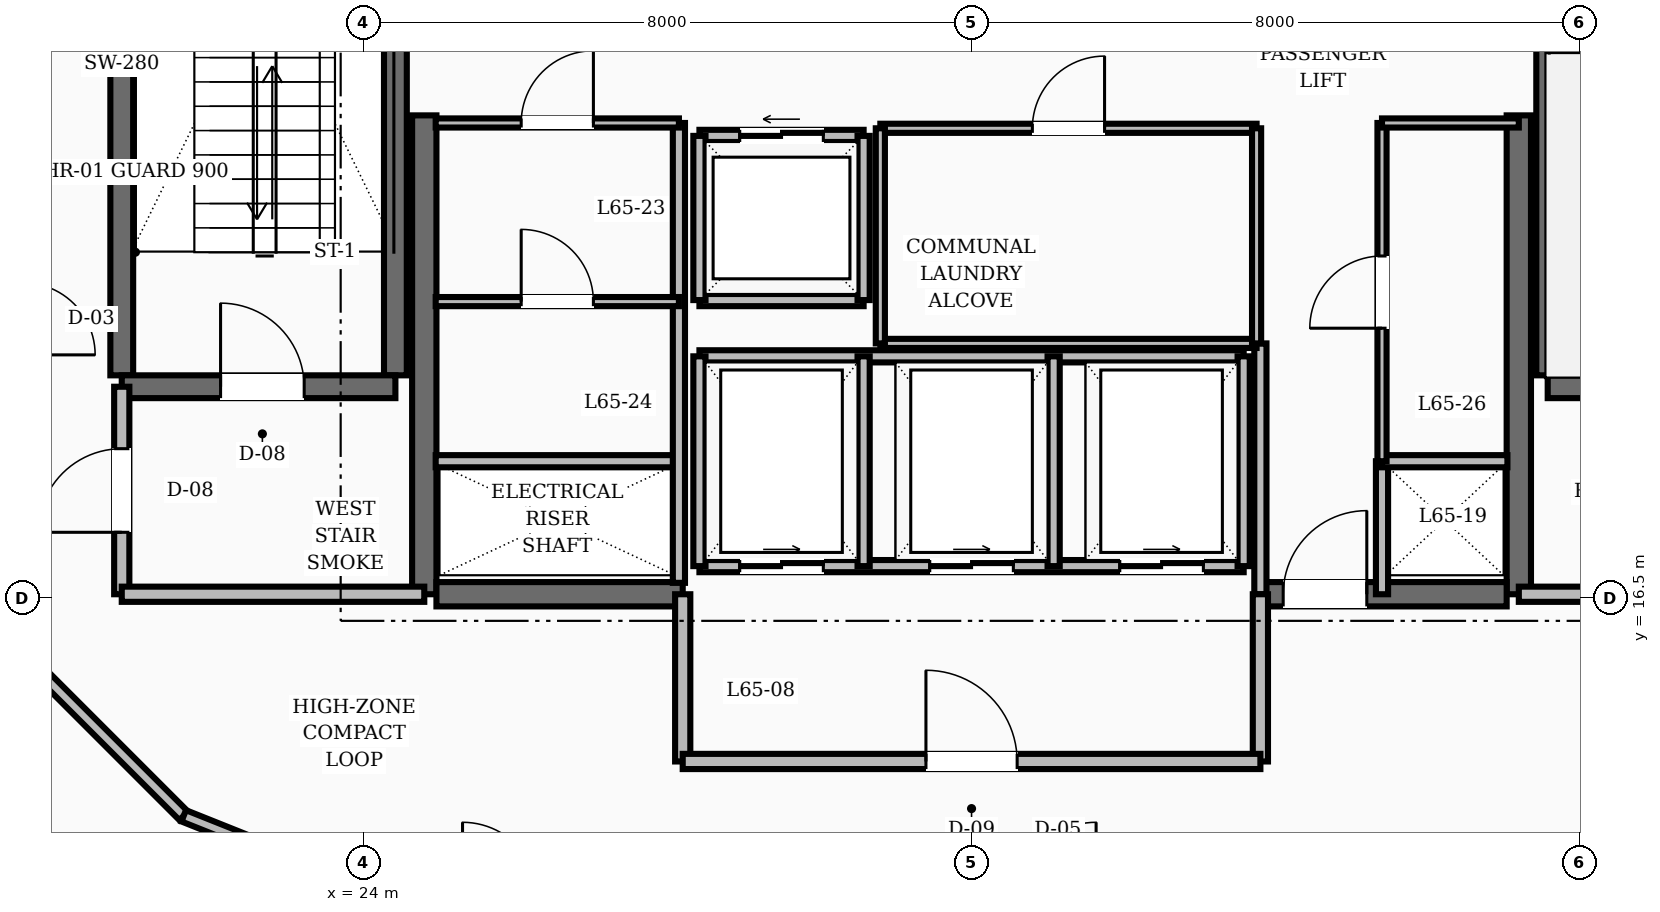
"""IFC4 building model, lengths in metres.
Left out: names, types, materials, properties, quantities, classifications, styles, units other than length and angle.
Written with IfcOpenShell. Run it as: python <this file> out.ifc"""

import sys

from ifc_helpers import new_model, si_unit, direction, frame, frame_2d, origin, place, context, subcontext, project, spatial, rectangle, extrude, element, fill, save


model = new_model("IFC4")
c1 = context("Model", 3, precision=1e-05, world=origin(), true_north=direction((0.0, 1.0)))
c2 = subcontext(c1, "Body", "Model", "MODEL_VIEW")
j1 = project(units=[si_unit("LENGTHUNIT", "METRE"), si_unit("PLANEANGLEUNIT", "RADIAN")], contexts=[c1])
p1 = place(None, origin())
s1 = spatial("IfcSite", under=j1, at=p1, CompositionType="ELEMENT")
p2 = place(p1, origin())
s2 = spatial("IfcBuilding", under=s1, at=p2, CompositionType="ELEMENT")
p3 = place(p2, frame((0.0, 0.0, 250.8)))
s3 = spatial("IfcBuildingStorey", under=s2, at=p3, CompositionType="ELEMENT", Elevation=250.8)
for number, where, z_axis, x_axis in (
    (1, (24.8, 16.55, 0.0), (0.0, 0.0, 1.0), (0.0, 1.0, 0.0)),
    (2, (39.2, 16.55, 0.0), (0.0, 0.0, 1.0), (0.0, 1.0, 0.0)),
):
    element("IfcWall", number, at=place(p3, frame(where, z_axis=z_axis, x_axis=x_axis)), inside=s3, PredefinedType="SHEAR", context=c2, shape_type="SweptSolid", body=[
        extrude(rectangle(XDim=6.3, YDim=0.32, at=frame_2d((3.15, 0.0))), origin(), (0.0, 0.0, 1.0), 3.6),
    ])
p4 = place(p3, frame((24.96, 16.55, 0.0), z_axis=(0.0, 0.0, 1.0), x_axis=(1.0, 0.0, 0.0)))
e3 = element("IfcWall", 3, at=p4, inside=s3, PredefinedType="SHEAR", context=c2, shape_type="SweptSolid", body=[
    extrude(rectangle(XDim=3.24, YDim=0.32, at=frame_2d((1.62, 0.0))), origin(), (0.0, 0.0, 1.0), 3.6),
])
p5 = place(p3, frame((35.8, 16.55, 0.0), z_axis=(0.0, 0.0, 1.0), x_axis=(1.0, 0.0, 0.0)))
e4 = element("IfcWall", 4, at=p5, inside=s3, PredefinedType="SHEAR", context=c2, shape_type="SweptSolid", body=[
    extrude(rectangle(XDim=3.24, YDim=0.32, at=frame_2d((1.62, 0.0))), origin(), (0.0, 0.0, 1.0), 3.6),
])
p6 = place(p5, frame((0.3, 0.0, 0.0)))
e5 = element("IfcOpeningElement", 5, at=p6, cuts=e4, PredefinedType="OPENING", context=c2, shape_type="SweptSolid", body=[
    extrude(rectangle(XDim=1.1, YDim=2.1, at=frame_2d((0.55, 1.05))), frame((0.0, 0.17, 0.0), z_axis=(0.0, -1.0, 0.0), x_axis=(1.0, 0.0, 0.0)), (0.0, 0.0, 1.0), 0.34),
])
for number, where, z_axis, x_axis in (
    (6, (20.82, 19.43, 0.0), (0.0, 0.0, 1.0), (0.0, 1.0, 0.0)),
    (7, (24.42, 19.43, 0.0), (0.0, 0.0, 1.0), (0.0, 1.0, 0.0)),
):
    element("IfcWall", number, at=place(p3, frame(where, z_axis=z_axis, x_axis=x_axis)), inside=s3, PredefinedType="SHEAR", context=c2, shape_type="SweptSolid", body=[
        extrude(rectangle(XDim=8.74, YDim=0.3, at=frame_2d((4.37, 0.0))), origin(), (0.0, 0.0, 1.0), 3.6),
    ])
p7 = place(p3, frame((20.82, 19.28, 0.0), z_axis=(0.0, 0.0, 1.0), x_axis=(1.0, 0.0, 0.0)))
e8 = element("IfcWall", 8, at=p7, inside=s3, PredefinedType="SHEAR", context=c2, shape_type="SweptSolid", body=[
    extrude(rectangle(XDim=3.6, YDim=0.3, at=frame_2d((1.8, 0.0))), origin(), (0.0, 0.0, 1.0), 3.6),
])
p8 = place(p7, frame((1.3, 0.0, 0.0)))
e9 = element("IfcOpeningElement", 9, at=p8, cuts=e8, PredefinedType="OPENING", context=c2, shape_type="SweptSolid", body=[
    extrude(rectangle(XDim=1.1, YDim=2.1, at=frame_2d((0.55, 1.05))), frame((0.0, 0.16, 0.0), z_axis=(0.0, -1.0, 0.0), x_axis=(1.0, 0.0, 0.0)), (0.0, 0.0, 1.0), 0.32),
])
p9 = place(p3, frame((39.58, 19.43, 0.0), z_axis=(0.0, 0.0, 1.0), x_axis=(0.0, 1.0, 0.0)))
e10 = element("IfcWall", 10, at=p9, inside=s3, PredefinedType="SHEAR", context=c2, shape_type="SweptSolid", body=[
    extrude(rectangle(XDim=8.74, YDim=0.3, at=frame_2d((4.37, 0.0))), origin(), (0.0, 0.0, 1.0), 3.6),
])
p10 = place(p3, frame((39.58, 19.28, 0.0), z_axis=(0.0, 0.0, 1.0), x_axis=(1.0, 0.0, 0.0)))
e11 = element("IfcWall", 11, at=p10, inside=s3, PredefinedType="SHEAR", context=c2, shape_type="SweptSolid", body=[
    extrude(rectangle(XDim=3.6, YDim=0.3, at=frame_2d((1.8, 0.0))), origin(), (0.0, 0.0, 1.0), 3.6),
])
p11 = place(p3, frame((20.82, 16.55, 0.0), z_axis=(0.0, 0.0, 1.0), x_axis=(0.0, 1.0, 0.0)))
e12 = element("IfcWall", 12, at=p11, inside=s3, PredefinedType="SOLIDWALL", context=c2, shape_type="SweptSolid", body=[
    extrude(rectangle(XDim=2.73, YDim=0.2, at=frame_2d((1.365, 0.0))), origin(), (0.0, 0.0, 1.0), 2.87),
])
p12 = place(p11, frame((0.815, 0.0, 0.0)))
e13 = element("IfcOpeningElement", 13, at=p12, cuts=e12, PredefinedType="OPENING", context=c2, shape_type="SweptSolid", body=[
    extrude(rectangle(XDim=1.1, YDim=2.1, at=frame_2d((0.55, 1.05))), frame((0.0, 0.11, 0.0), z_axis=(0.0, -1.0, 0.0), x_axis=(1.0, 0.0, 0.0)), (0.0, 0.0, 1.0), 0.22),
])
for number, where, z_axis, x_axis in (
    (14, (20.82, 16.55, 0.0), (0.0, 0.0, 1.0), (1.0, 0.0, 0.0)),
    (15, (39.2, 16.55, 0.0), (0.0, 0.0, 1.0), (1.0, 0.0, 0.0)),
):
    element("IfcWall", number, at=place(p3, frame(where, z_axis=z_axis, x_axis=x_axis)), inside=s3, PredefinedType="SOLIDWALL", context=c2, shape_type="SweptSolid", body=[
        extrude(rectangle(XDim=3.98, YDim=0.2, at=frame_2d((1.99, 0.0))), origin(), (0.0, 0.0, 1.0), 2.87),
    ])
p13 = place(p3, frame((35.8, 16.55, 0.0), z_axis=(0.0, 0.0, 1.0), x_axis=(0.0, 1.0, 0.0)))
e16 = element("IfcWall", 16, at=p13, inside=s3, PredefinedType="SOLIDWALL", context=c2, shape_type="SweptSolid", body=[
    extrude(rectangle(XDim=3.3, YDim=0.16, at=frame_2d((1.65, 0.0))), origin(), (0.0, 0.0, 1.0), 2.87),
])
p14 = place(p3, frame((37.4, 16.55, 0.0), z_axis=(0.0, 0.0, 1.0), x_axis=(0.0, 1.0, 0.0)))
e17 = element("IfcWall", 17, at=p14, inside=s3, PredefinedType="SOLIDWALL", context=c2, shape_type="SweptSolid", body=[
    extrude(rectangle(XDim=1.75, YDim=0.16, at=frame_2d((0.875, 0.0))), origin(), (0.0, 0.0, 1.0), 2.87),
])
for number, where, z_axis, x_axis in (
    (18, (28.2, 14.35, 0.0), (0.0, 0.0, 1.0), (0.0, 1.0, 0.0)),
    (19, (35.8, 14.35, 0.0), (0.0, 0.0, 1.0), (0.0, 1.0, 0.0)),
):
    element("IfcWall", number, at=place(p3, frame(where, z_axis=z_axis, x_axis=x_axis)), inside=s3, PredefinedType="SOLIDWALL", context=c2, shape_type="SweptSolid", body=[
        extrude(rectangle(XDim=2.2, YDim=0.2, at=frame_2d((1.1, 0.0))), origin(), (0.0, 0.0, 1.0), 2.87),
    ])
p15 = place(p3, frame((28.2, 14.35, 0.0), z_axis=(0.0, 0.0, 1.0), x_axis=(1.0, 0.0, 0.0)))
e20 = element("IfcWall", 20, at=p15, inside=s3, PredefinedType="SOLIDWALL", context=c2, shape_type="SweptSolid", body=[
    extrude(rectangle(XDim=7.6, YDim=0.2, at=frame_2d((3.8, 0.0))), origin(), (0.0, 0.0, 1.0), 2.87),
])
p16 = place(p15, frame((3.2, 0.0, 0.0)))
e21 = element("IfcOpeningElement", 21, at=p16, cuts=e20, PredefinedType="OPENING", context=c2, shape_type="SweptSolid", body=[
    extrude(rectangle(XDim=1.2, YDim=2.1, at=frame_2d((0.6, 1.05))), frame((0.0, 0.11, 0.0), z_axis=(0.0, -1.0, 0.0), x_axis=(1.0, 0.0, 0.0)), (0.0, 0.0, 1.0), 0.22),
])
p17 = place(p3, frame((28.42, 22.58, 0.0), z_axis=(0.0, 0.0, 1.0), x_axis=(1.0, 0.0, 0.0)))
e22 = element("IfcWall", 22, at=p17, inside=s3, PredefinedType="SOLIDWALL", context=c2, shape_type="SweptSolid", body=[
    extrude(rectangle(XDim=2.16, YDim=0.16, at=frame_2d((1.08, 0.0))), origin(), (0.0, 0.0, 1.0), 2.87),
])
p18 = place(p17, frame((0.53, 0.0, 0.0)))
e23 = element("IfcOpeningElement", 23, at=p18, cuts=e22, PredefinedType="OPENING", context=c2, shape_type="SweptSolid", body=[
    extrude(rectangle(XDim=1.1, YDim=2.15, at=frame_2d((0.55, 1.075))), frame((0.0, 0.09, 0.0), z_axis=(0.0, -1.0, 0.0), x_axis=(1.0, 0.0, 0.0)), (0.0, 0.0, 1.0), 0.18),
])
for number, where, z_axis, x_axis in (
    (24, (28.42, 20.42, 0.0), (0.0, 0.0, 1.0), (1.0, 0.0, 0.0)),
    (25, (28.42, 20.42, 0.0), (0.0, 0.0, 1.0), (0.0, 1.0, 0.0)),
    (26, (30.58, 20.42, 0.0), (0.0, 0.0, 1.0), (0.0, 1.0, 0.0)),
):
    element("IfcWall", number, at=place(p3, frame(where, z_axis=z_axis, x_axis=x_axis)), inside=s3, PredefinedType="SOLIDWALL", context=c2, shape_type="SweptSolid", body=[
        extrude(rectangle(XDim=2.16, YDim=0.16, at=frame_2d((1.08, 0.0))), origin(), (0.0, 0.0, 1.0), 2.87),
    ])
p19 = place(p3, frame((28.42, 16.92, 0.0), z_axis=(0.0, 0.0, 1.0), x_axis=(1.0, 0.0, 0.0)))
e27 = element("IfcWall", 27, at=p19, inside=s3, PredefinedType="SOLIDWALL", context=c2, shape_type="SweptSolid", body=[
    extrude(rectangle(XDim=7.16, YDim=0.16, at=frame_2d((3.58, 0.0))), origin(), (0.0, 0.0, 1.0), 2.87),
])
p20 = place(p19, frame((0.53, 0.0, 0.0)))
e28 = element("IfcOpeningElement", 28, at=p20, cuts=e27, PredefinedType="OPENING", context=c2, shape_type="SweptSolid", body=[
    extrude(rectangle(XDim=1.1, YDim=2.15, at=frame_2d((0.55, 1.075))), frame((0.0, 0.09, 0.0), z_axis=(0.0, -1.0, 0.0), x_axis=(1.0, 0.0, 0.0)), (0.0, 0.0, 1.0), 0.18),
])
p21 = place(p19, frame((3.03, 0.0, 0.0)))
e29 = element("IfcOpeningElement", 29, at=p21, cuts=e27, PredefinedType="OPENING", context=c2, shape_type="SweptSolid", body=[
    extrude(rectangle(XDim=1.1, YDim=2.15, at=frame_2d((0.55, 1.075))), frame((0.0, 0.09, 0.0), z_axis=(0.0, -1.0, 0.0), x_axis=(1.0, 0.0, 0.0)), (0.0, 0.0, 1.0), 0.18),
])
p22 = place(p19, frame((5.53, 0.0, 0.0)))
e30 = element("IfcOpeningElement", 30, at=p22, cuts=e27, PredefinedType="OPENING", context=c2, shape_type="SweptSolid", body=[
    extrude(rectangle(XDim=1.1, YDim=2.15, at=frame_2d((0.55, 1.075))), frame((0.0, 0.09, 0.0), z_axis=(0.0, -1.0, 0.0), x_axis=(1.0, 0.0, 0.0)), (0.0, 0.0, 1.0), 0.18),
])
p23 = place(p3, frame((28.42, 19.68, 0.0), z_axis=(0.0, 0.0, 1.0), x_axis=(1.0, 0.0, 0.0)))
e31 = element("IfcWall", 31, at=p23, inside=s3, PredefinedType="SOLIDWALL", context=c2, shape_type="SweptSolid", body=[
    extrude(rectangle(XDim=7.16, YDim=0.16, at=frame_2d((3.58, 0.0))), origin(), (0.0, 0.0, 1.0), 2.87),
])
for number, where, z_axis, x_axis in (
    (32, (28.42, 16.92, 0.0), (0.0, 0.0, 1.0), (0.0, 1.0, 0.0)),
    (33, (30.58, 16.92, 0.0), (0.0, 0.0, 1.0), (0.0, 1.0, 0.0)),
    (34, (33.08, 16.92, 0.0), (0.0, 0.0, 1.0), (0.0, 1.0, 0.0)),
    (35, (35.58, 16.92, 0.0), (0.0, 0.0, 1.0), (0.0, 1.0, 0.0)),
):
    element("IfcWall", number, at=place(p3, frame(where, z_axis=z_axis, x_axis=x_axis)), inside=s3, PredefinedType="SOLIDWALL", context=c2, shape_type="SweptSolid", body=[
        extrude(rectangle(XDim=2.76, YDim=0.16, at=frame_2d((1.38, 0.0))), origin(), (0.0, 0.0, 1.0), 2.87),
    ])
p24 = place(p3, frame((30.8, 22.68, 0.0), z_axis=(0.0, 0.0, 1.0), x_axis=(1.0, 0.0, 0.0)))
e36 = element("IfcWall", 36, at=p24, inside=s3, PredefinedType="PARTITIONING", context=c2, shape_type="SweptSolid", body=[
    extrude(rectangle(XDim=4.95, YDim=0.12, at=frame_2d((2.475, 0.0))), origin(), (0.0, 0.0, 1.0), 2.87),
])
p25 = place(p24, frame((2.0, 0.0, 0.0)))
e37 = element("IfcOpeningElement", 37, at=p25, cuts=e36, PredefinedType="OPENING", context=c2, shape_type="SweptSolid", body=[
    extrude(rectangle(XDim=0.95, YDim=2.1, at=frame_2d((0.475, 1.05))), frame((0.0, 0.07, 0.0), z_axis=(0.0, -1.0, 0.0), x_axis=(1.0, 0.0, 0.0)), (0.0, 0.0, 1.0), 0.14),
])
p26 = place(p3, frame((30.8, 19.85, 0.0), z_axis=(0.0, 0.0, 1.0), x_axis=(1.0, 0.0, 0.0)))
e38 = element("IfcWall", 38, at=p26, inside=s3, PredefinedType="PARTITIONING", context=c2, shape_type="SweptSolid", body=[
    extrude(rectangle(XDim=4.95, YDim=0.12, at=frame_2d((2.475, 0.0))), origin(), (0.0, 0.0, 1.0), 2.87),
])
for number, where, z_axis, x_axis in (
    (39, (30.8, 19.85, 0.0), (0.0, 0.0, 1.0), (0.0, 1.0, 0.0)),
    (40, (35.75, 19.85, 0.0), (0.0, 0.0, 1.0), (0.0, 1.0, 0.0)),
):
    element("IfcWall", number, at=place(p3, frame(where, z_axis=z_axis, x_axis=x_axis)), inside=s3, PredefinedType="PARTITIONING", context=c2, shape_type="SweptSolid", body=[
        extrude(rectangle(XDim=2.83, YDim=0.12, at=frame_2d((1.415, 0.0))), origin(), (0.0, 0.0, 1.0), 2.87),
    ])
p27 = place(p3, frame((24.95, 18.3, 0.0), z_axis=(0.0, 0.0, 1.0), x_axis=(1.0, 0.0, 0.0)))
e41 = element("IfcWall", 41, at=p27, inside=s3, PredefinedType="SOLIDWALL", context=c2, shape_type="SweptSolid", body=[
    extrude(rectangle(XDim=3.2, YDim=0.16, at=frame_2d((1.6, 0.0))), origin(), (0.0, 0.0, 1.0), 2.87),
])
p28 = place(p3, frame((28.15, 16.7, 0.0), z_axis=(0.0, 0.0, 1.0), x_axis=(0.0, 1.0, 0.0)))
e42 = element("IfcWall", 42, at=p28, inside=s3, PredefinedType="SOLIDWALL", context=c2, shape_type="SweptSolid", body=[
    extrude(rectangle(XDim=6.05, YDim=0.16, at=frame_2d((3.025, 0.0))), origin(), (0.0, 0.0, 1.0), 2.87),
])
p29 = place(p3, frame((37.4, 18.3, 0.0), z_axis=(0.0, 0.0, 1.0), x_axis=(1.0, 0.0, 0.0)))
e43 = element("IfcWall", 43, at=p29, inside=s3, PredefinedType="SOLIDWALL", context=c2, shape_type="SweptSolid", body=[
    extrude(rectangle(XDim=1.65, YDim=0.16, at=frame_2d((0.825, 0.0))), origin(), (0.0, 0.0, 1.0), 2.87),
])
p30 = place(p3, frame((24.95, 22.75, 0.0), z_axis=(0.0, 0.0, 1.0), x_axis=(1.0, 0.0, 0.0)))
e44 = element("IfcWall", 44, at=p30, inside=s3, PredefinedType="PARTITIONING", context=c2, shape_type="SweptSolid", body=[
    extrude(rectangle(XDim=3.2, YDim=0.12, at=frame_2d((1.6, 0.0))), origin(), (0.0, 0.0, 1.0), 2.87),
])
p31 = place(p30, frame((1.125, 0.0, 0.0)))
e45 = element("IfcOpeningElement", 45, at=p31, cuts=e44, PredefinedType="OPENING", context=c2, shape_type="SweptSolid", body=[
    extrude(rectangle(XDim=0.95, YDim=2.1, at=frame_2d((0.475, 1.05))), frame((0.0, 0.07, 0.0), z_axis=(0.0, -1.0, 0.0), x_axis=(1.0, 0.0, 0.0)), (0.0, 0.0, 1.0), 0.14),
])
p32 = place(p3, frame((37.4, 18.3, 0.0), z_axis=(0.0, 0.0, 1.0), x_axis=(0.0, 1.0, 0.0)))
e46 = element("IfcWall", 46, at=p32, inside=s3, PredefinedType="PARTITIONING", context=c2, shape_type="SweptSolid", body=[
    extrude(rectangle(XDim=4.45, YDim=0.12, at=frame_2d((2.225, 0.0))), origin(), (0.0, 0.0, 1.0), 2.87),
])
p33 = place(p32, frame((1.75, 0.0, 0.0)))
e47 = element("IfcOpeningElement", 47, at=p33, cuts=e46, PredefinedType="OPENING", context=c2, shape_type="SweptSolid", body=[
    extrude(rectangle(XDim=0.95, YDim=2.1, at=frame_2d((0.475, 1.05))), frame((0.0, 0.07, 0.0), z_axis=(0.0, -1.0, 0.0), x_axis=(1.0, 0.0, 0.0)), (0.0, 0.0, 1.0), 0.14),
])
p34 = place(p3, frame((37.4, 22.75, 0.0), z_axis=(0.0, 0.0, 1.0), x_axis=(1.0, 0.0, 0.0)))
e48 = element("IfcWall", 48, at=p34, inside=s3, PredefinedType="PARTITIONING", context=c2, shape_type="SweptSolid", body=[
    extrude(rectangle(XDim=1.8, YDim=0.12, at=frame_2d((0.9, 0.0))), origin(), (0.0, 0.0, 1.0), 2.87),
])
p35 = place(p3, frame((24.95, 20.4, 0.0), z_axis=(0.0, 0.0, 1.0), x_axis=(1.0, 0.0, 0.0)))
e49 = element("IfcWall", 49, at=p35, inside=s3, PredefinedType="PARTITIONING", context=c2, shape_type="SweptSolid", body=[
    extrude(rectangle(XDim=3.2, YDim=0.12, at=frame_2d((1.6, 0.0))), origin(), (0.0, 0.0, 1.0), 2.87),
])
p36 = place(p35, frame((1.125, 0.0, 0.0)))
e50 = element("IfcOpeningElement", 50, at=p36, cuts=e49, PredefinedType="OPENING", context=c2, shape_type="SweptSolid", body=[
    extrude(rectangle(XDim=0.95, YDim=2.1, at=frame_2d((0.475, 1.05))), frame((0.0, 0.07, 0.0), z_axis=(0.0, -1.0, 0.0), x_axis=(1.0, 0.0, 0.0)), (0.0, 0.0, 1.0), 0.14),
])
p37 = place(p3, frame((19.573, 15.697, 0.0), z_axis=(0.0, 0.0, 1.0), x_axis=(0.707106781187, -0.707106781187, 0.0)))
e51 = element("IfcWall", 51, at=p37, inside=s3, PredefinedType="SOLIDWALL", context=c2, shape_type="SweptSolid", body=[
    extrude(rectangle(XDim=2.916, YDim=0.16, at=frame_2d((1.458, 0.0))), origin(), (0.0, 0.0, 1.0), 2.87),
])
p38 = place(p3, frame((21.635, 13.635, 0.0), z_axis=(0.0, 0.0, 1.0), x_axis=(0.92856882165, -0.371160266542, 0.0)))
e52 = element("IfcWall", 52, at=p38, inside=s3, PredefinedType="SOLIDWALL", context=c2, shape_type="SweptSolid", body=[
    extrude(rectangle(XDim=2.923, YDim=0.16, at=frame_2d((1.461, 0.0))), origin(), (0.0, 0.0, 1.0), 2.87),
])
p39 = place(p3, frame((39.651, 12.55, 0.0), z_axis=(0.0, 0.0, 1.0), x_axis=(0.92856882165, 0.371160266542, 0.0)))
e53 = element("IfcWall", 53, at=p39, inside=s3, PredefinedType="SOLIDWALL", context=c2, shape_type="SweptSolid", body=[
    extrude(rectangle(XDim=2.923, YDim=0.16, at=frame_2d((1.461, 0.0))), origin(), (0.0, 0.0, 1.0), 2.87),
])
p40 = place(p39, frame((0.987, 0.0, 0.0)))
e54 = element("IfcOpeningElement", 54, at=p40, cuts=e53, PredefinedType="OPENING", context=c2, shape_type="SweptSolid", body=[
    extrude(rectangle(XDim=0.95, YDim=2.1, at=frame_2d((0.475, 1.05))), frame((0.0, 0.09, 0.0), z_axis=(0.0, -1.0, 0.0), x_axis=(1.0, 0.0, 0.0)), (0.0, 0.0, 1.0), 0.18),
])
p41 = place(p8, origin())
e55 = element("IfcDoor", 55, at=p41, inside=s3, OperationType="SINGLE_SWING_LEFT", PredefinedType="DOOR", context=c2, shape_type="SweptSolid", body=[
    extrude(rectangle(XDim=1.1, YDim=2.1, at=frame_2d((0.55, 1.05))), frame((0.0, 0.025, 0.0), z_axis=(0.0, -1.0, 0.0), x_axis=(1.0, 0.0, 0.0)), (0.0, 0.0, 1.0), 0.05),
])
fill(e9, e55)
p42 = place(p12, origin())
e56 = element("IfcDoor", 56, at=p42, inside=s3, OperationType="SINGLE_SWING_LEFT", PredefinedType="DOOR", context=c2, shape_type="SweptSolid", body=[
    extrude(rectangle(XDim=1.1, YDim=2.1, at=frame_2d((0.55, 1.05))), frame((0.0, 0.025, 0.0), z_axis=(0.0, -1.0, 0.0), x_axis=(1.0, 0.0, 0.0)), (0.0, 0.0, 1.0), 0.05),
])
fill(e13, e56)
p43 = place(p6, origin())
e57 = element("IfcDoor", 57, at=p43, inside=s3, OperationType="SINGLE_SWING_RIGHT", PredefinedType="DOOR", context=c2, shape_type="SweptSolid", body=[
    extrude(rectangle(XDim=1.1, YDim=2.1, at=frame_2d((0.55, 1.05))), frame((0.0, 0.025, 0.0), z_axis=(0.0, -1.0, 0.0), x_axis=(1.0, 0.0, 0.0)), (0.0, 0.0, 1.0), 0.05),
])
fill(e5, e57)
p44 = place(p16, origin())
e58 = element("IfcDoor", 58, at=p44, inside=s3, OperationType="SINGLE_SWING_LEFT", PredefinedType="DOOR", context=c2, shape_type="SweptSolid", body=[
    extrude(rectangle(XDim=1.2, YDim=2.1, at=frame_2d((0.6, 1.05))), frame((0.0, 0.025, 0.0), z_axis=(0.0, -1.0, 0.0), x_axis=(1.0, 0.0, 0.0)), (0.0, 0.0, 1.0), 0.05),
])
fill(e21, e58)
p45 = place(p18, origin())
e59 = element("IfcDoor", 59, at=p45, inside=s3, OperationType="SLIDING_TO_LEFT", PredefinedType="DOOR", context=c2, shape_type="SweptSolid", body=[
    extrude(rectangle(XDim=1.1, YDim=2.15, at=frame_2d((0.55, 1.075))), frame((0.0, 0.025, 0.0), z_axis=(0.0, -1.0, 0.0), x_axis=(1.0, 0.0, 0.0)), (0.0, 0.0, 1.0), 0.05),
])
fill(e23, e59)
p46 = place(p20, origin())
e60 = element("IfcDoor", 60, at=p46, inside=s3, OperationType="SLIDING_TO_RIGHT", PredefinedType="DOOR", context=c2, shape_type="SweptSolid", body=[
    extrude(rectangle(XDim=1.1, YDim=2.15, at=frame_2d((0.55, 1.075))), frame((0.0, 0.025, 0.0), z_axis=(0.0, -1.0, 0.0), x_axis=(1.0, 0.0, 0.0)), (0.0, 0.0, 1.0), 0.05),
])
fill(e28, e60)
p47 = place(p21, origin())
e61 = element("IfcDoor", 61, at=p47, inside=s3, OperationType="SLIDING_TO_RIGHT", PredefinedType="DOOR", context=c2, shape_type="SweptSolid", body=[
    extrude(rectangle(XDim=1.1, YDim=2.15, at=frame_2d((0.55, 1.075))), frame((0.0, 0.025, 0.0), z_axis=(0.0, -1.0, 0.0), x_axis=(1.0, 0.0, 0.0)), (0.0, 0.0, 1.0), 0.05),
])
fill(e29, e61)
p48 = place(p22, origin())
e62 = element("IfcDoor", 62, at=p48, inside=s3, OperationType="SLIDING_TO_RIGHT", PredefinedType="DOOR", context=c2, shape_type="SweptSolid", body=[
    extrude(rectangle(XDim=1.1, YDim=2.15, at=frame_2d((0.55, 1.075))), frame((0.0, 0.025, 0.0), z_axis=(0.0, -1.0, 0.0), x_axis=(1.0, 0.0, 0.0)), (0.0, 0.0, 1.0), 0.05),
])
fill(e30, e62)
p49 = place(p25, origin())
e63 = element("IfcDoor", 63, at=p49, inside=s3, OperationType="SINGLE_SWING_RIGHT", PredefinedType="DOOR", context=c2, shape_type="SweptSolid", body=[
    extrude(rectangle(XDim=0.95, YDim=2.1, at=frame_2d((0.475, 1.05))), frame((0.0, 0.025, 0.0), z_axis=(0.0, -1.0, 0.0), x_axis=(1.0, 0.0, 0.0)), (0.0, 0.0, 1.0), 0.05),
])
fill(e37, e63)
p50 = place(p31, origin())
e64 = element("IfcDoor", 64, at=p50, inside=s3, OperationType="SINGLE_SWING_RIGHT", PredefinedType="DOOR", context=c2, shape_type="SweptSolid", body=[
    extrude(rectangle(XDim=0.95, YDim=2.1, at=frame_2d((0.475, 1.05))), frame((0.0, 0.025, 0.0), z_axis=(0.0, -1.0, 0.0), x_axis=(1.0, 0.0, 0.0)), (0.0, 0.0, 1.0), 0.05),
])
fill(e45, e64)
p51 = place(p36, origin())
e65 = element("IfcDoor", 65, at=p51, inside=s3, OperationType="SINGLE_SWING_LEFT", PredefinedType="DOOR", context=c2, shape_type="SweptSolid", body=[
    extrude(rectangle(XDim=0.95, YDim=2.1, at=frame_2d((0.475, 1.05))), frame((0.0, 0.025, 0.0), z_axis=(0.0, -1.0, 0.0), x_axis=(1.0, 0.0, 0.0)), (0.0, 0.0, 1.0), 0.05),
])
fill(e50, e65)
p52 = place(p33, origin())
e66 = element("IfcDoor", 66, at=p52, inside=s3, OperationType="SINGLE_SWING_LEFT", PredefinedType="DOOR", context=c2, shape_type="SweptSolid", body=[
    extrude(rectangle(XDim=0.95, YDim=2.1, at=frame_2d((0.475, 1.05))), frame((0.0, 0.025, 0.0), z_axis=(0.0, -1.0, 0.0), x_axis=(1.0, 0.0, 0.0)), (0.0, 0.0, 1.0), 0.05),
])
fill(e47, e66)
save(model, sys.argv[1])
